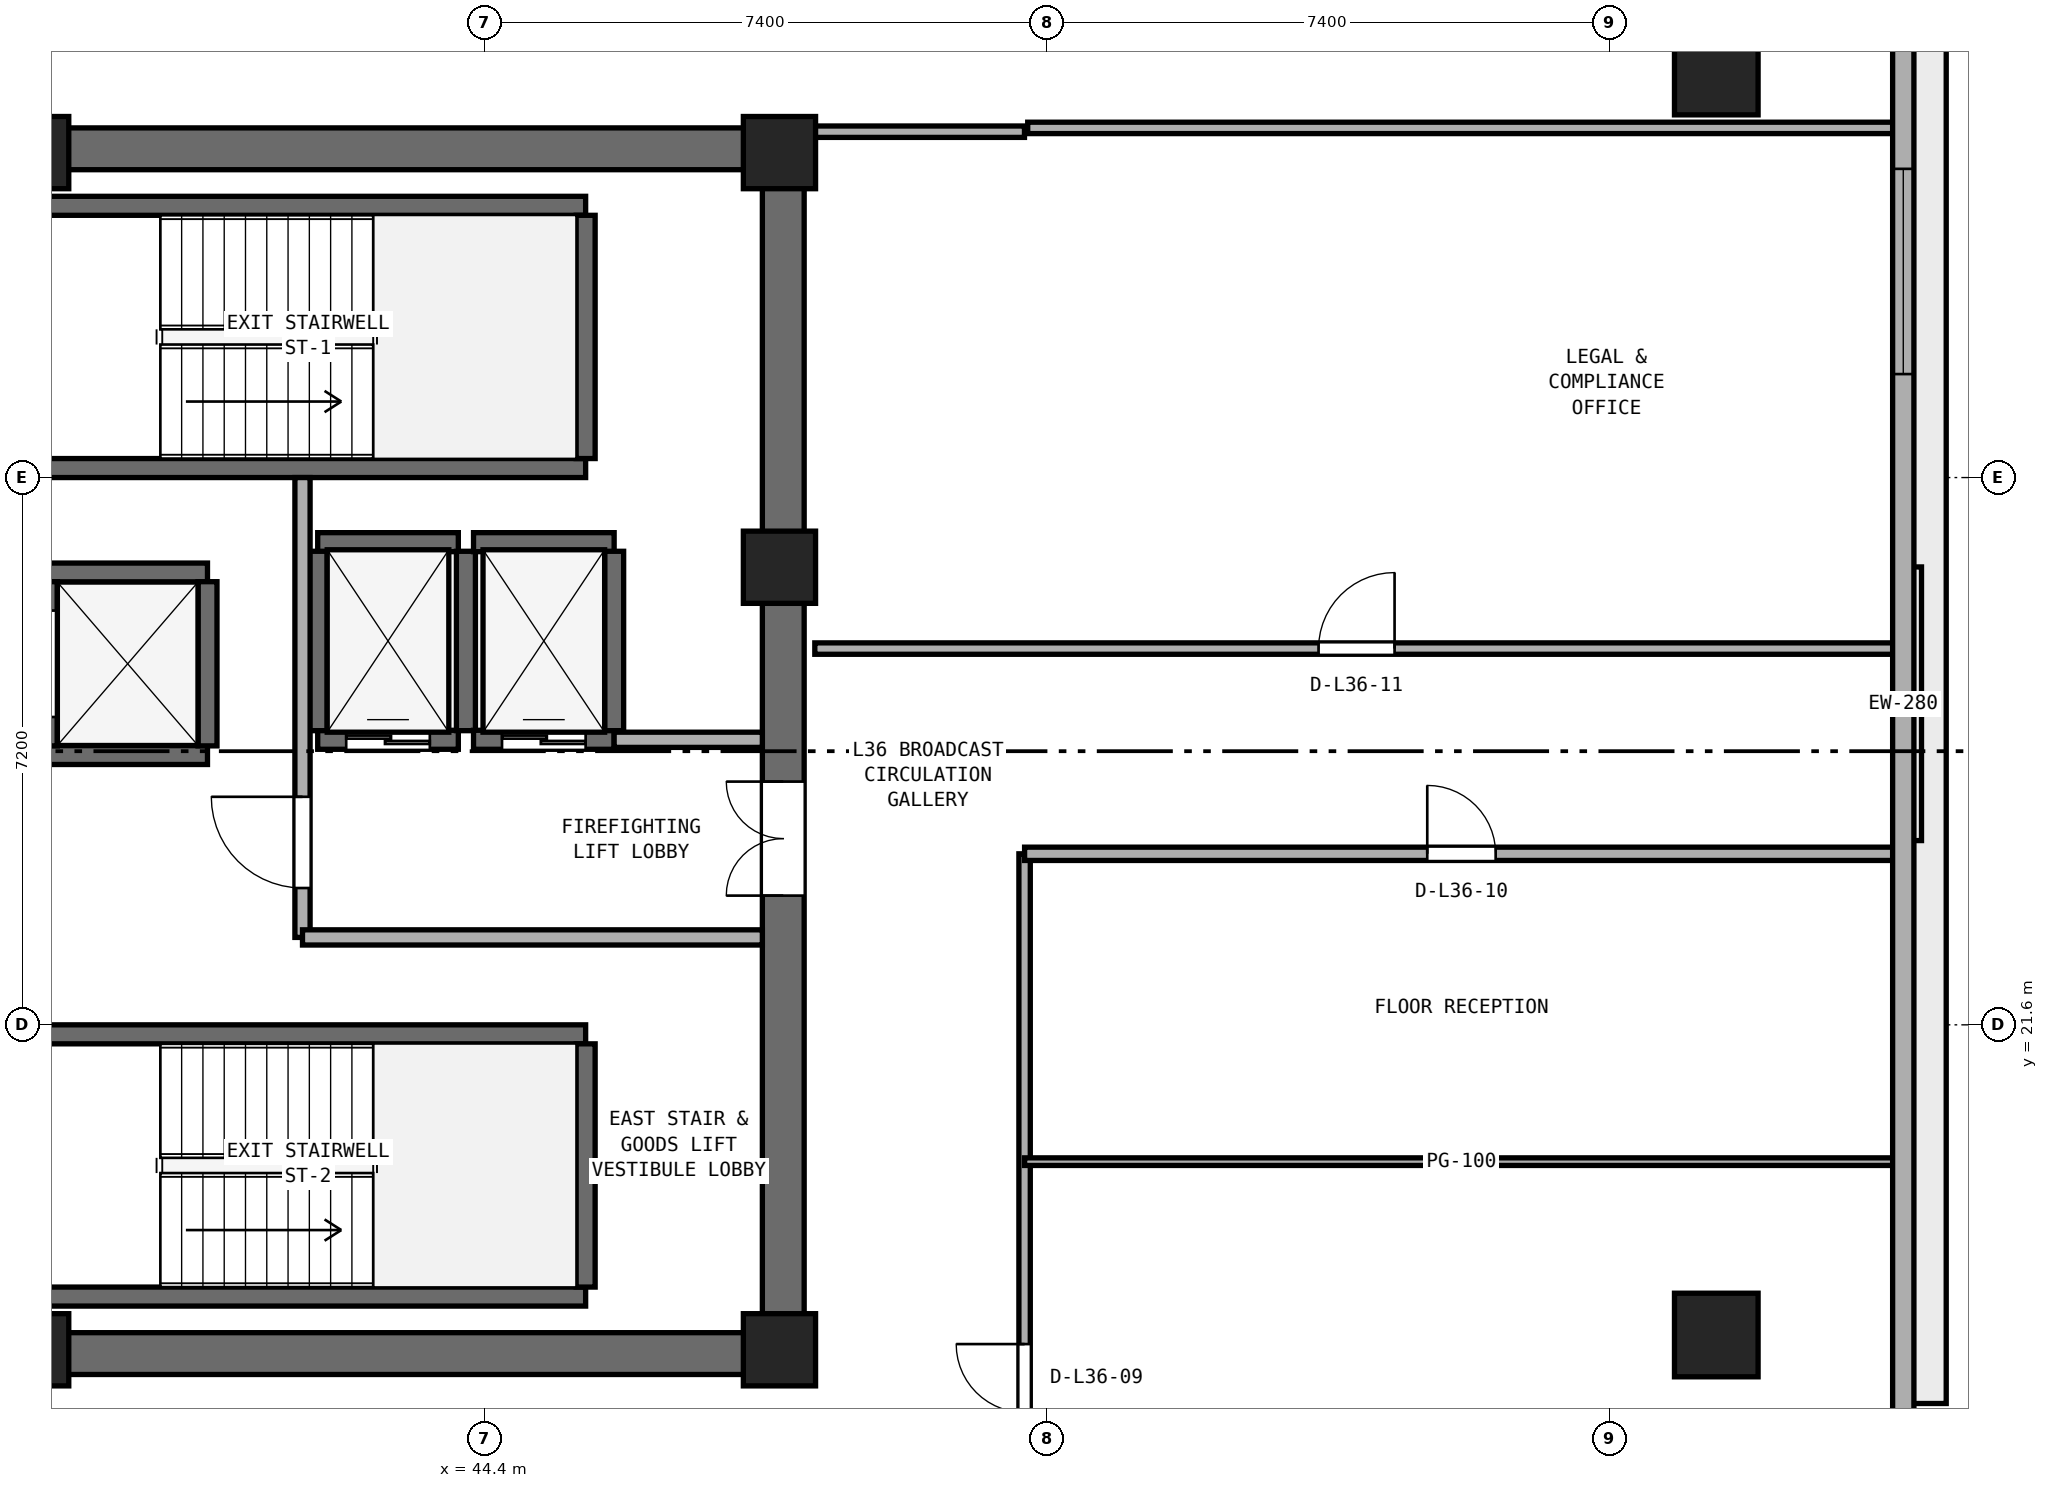
"""IFC4 building model, lengths in metres.
Left out: names, types, materials, properties, quantities, classifications, styles, units other than length and angle.
Written with IfcOpenShell. Run it as: python <this file> out.ifc"""

import sys

from ifc_helpers import new_model, si_unit, direction, frame, frame_2d, origin, origin_2d, place, context, subcontext, project, spatial, rectangle, extrude, element, fill, save


model = new_model("IFC4")
c1 = context("Model", 3, precision=1e-05, world=origin(), true_north=direction((0.0, 1.0)))
c2 = subcontext(c1, "Body", "Model", "MODEL_VIEW")
j1 = project(units=[si_unit("LENGTHUNIT", "METRE"), si_unit("PLANEANGLEUNIT", "RADIAN")], contexts=[c1])
p1 = place(None, origin())
s1 = spatial("IfcSite", under=j1, at=p1, CompositionType="ELEMENT")
p2 = place(p1, origin())
s2 = spatial("IfcBuilding", under=s1, at=p2, CompositionType="ELEMENT")
p3 = place(p2, frame((0.0, 0.0, 144.0)))
s3 = spatial("IfcBuildingStorey", under=s2, at=p3, CompositionType="ELEMENT", Elevation=144.0)
for number, where, z_axis, x_axis in (
    (1, (25.4, 17.275, 0.0), (0.0, 0.0, 1.0), (1.0, 0.0, 0.0)),
    (2, (25.4, 33.125, 0.0), (0.0, 0.0, 1.0), (1.0, 0.0, 0.0)),
):
    element("IfcWall", number, at=place(p3, frame(where, z_axis=z_axis, x_axis=x_axis)), inside=s3, PredefinedType="SHEAR", context=c2, shape_type="SweptSolid", body=[
        extrude(rectangle(XDim=23.2, YDim=0.55, at=frame_2d((11.6, 0.0))), origin(), (0.0, 0.0, 1.0), 3.54),
    ])
p4 = place(p3, frame((48.325, 17.55, 0.0), z_axis=(0.0, 0.0, 1.0), x_axis=(0.0, 1.0, 0.0)))
e3 = element("IfcWall", 3, at=p4, inside=s3, PredefinedType="SHEAR", context=c2, shape_type="SweptSolid", body=[
    extrude(rectangle(XDim=15.3, YDim=0.55, at=frame_2d((7.65, 0.0))), origin(), (0.0, 0.0, 1.0), 3.54),
])
p5 = place(p4, frame((5.75, 0.0, 0.0)))
e4 = element("IfcOpeningElement", 4, at=p5, cuts=e3, PredefinedType="OPENING", context=c2, shape_type="SweptSolid", body=[
    extrude(rectangle(XDim=1.5, YDim=2.15, at=frame_2d((0.75, 1.075))), frame((0.0, 0.285, 0.0), z_axis=(0.0, -1.0, 0.0), x_axis=(1.0, 0.0, 0.0)), (0.0, 0.0, 1.0), 0.57),
])
for number, where, z_axis, x_axis in (
    (5, (38.45, 17.325, 0.0), (0.0, 0.0, 1.0), (1.0, 0.0, 0.0)),
    (6, (48.275, 17.325, 0.0), (0.0, 0.0, 1.0), (1.0, 0.0, 0.0)),
    (7, (48.275, 27.62, 0.0), (0.0, 0.0, 1.0), (1.0, 0.0, 0.0)),
    (8, (48.275, 33.075, 0.0), (0.0, 0.0, 1.0), (1.0, 0.0, 0.0)),
    (9, (38.45, 33.075, 0.0), (0.0, 0.0, 1.0), (1.0, 0.0, 0.0)),
):
    element("IfcColumn", number, at=place(p3, frame(where, z_axis=z_axis, x_axis=x_axis)), inside=s3, PredefinedType="PILASTER", context=c2, shape_type="SweptSolid", body=[
        extrude(rectangle(XDim=0.95, YDim=0.95, at=origin_2d()), origin(), (0.0, 0.0, 1.0), 3.8),
    ])
for number, where, z_axis, x_axis in (
    (10, (60.6, 17.519, 0.0), (0.0, 0.0, 1.0), (1.0, 0.0, 0.0)),
    (11, (60.6, 34.122, 0.0), (0.0, 0.0, 1.0), (1.0, 0.0, 0.0)),
):
    element("IfcColumn", number, at=place(p3, frame(where, z_axis=z_axis, x_axis=x_axis)), inside=s3, PredefinedType="COLUMN", context=c2, shape_type="SweptSolid", body=[
        extrude(rectangle(XDim=1.1, YDim=1.1, at=origin_2d()), origin(), (0.0, 0.0, 1.0), 3.8),
    ])
for number, where, z_axis, x_axis in (
    (12, (38.425, 28.925, 0.0), (0.0, 0.0, 1.0), (1.0, 0.0, 0.0)),
    (13, (38.425, 32.375, 0.0), (0.0, 0.0, 1.0), (1.0, 0.0, 0.0)),
):
    element("IfcWall", number, at=place(p3, frame(where, z_axis=z_axis, x_axis=x_axis)), inside=s3, PredefinedType="SHEAR", context=c2, shape_type="SweptSolid", body=[
        extrude(rectangle(XDim=7.3, YDim=0.25, at=frame_2d((3.65, 0.0))), origin(), (0.0, 0.0, 1.0), 3.54),
    ])
p6 = place(p3, frame((45.725, 29.05, 0.0), z_axis=(0.0, 0.0, 1.0), x_axis=(0.0, 1.0, 0.0)))
e14 = element("IfcWall", 14, at=p6, inside=s3, PredefinedType="SHEAR", context=c2, shape_type="SweptSolid", body=[
    extrude(rectangle(XDim=3.2, YDim=0.25, at=frame_2d((1.6, 0.0))), origin(), (0.0, 0.0, 1.0), 3.54),
])
for number, where, z_axis, x_axis in (
    (15, (38.425, 18.025, 0.0), (0.0, 0.0, 1.0), (1.0, 0.0, 0.0)),
    (16, (38.425, 21.475, 0.0), (0.0, 0.0, 1.0), (1.0, 0.0, 0.0)),
):
    element("IfcWall", number, at=place(p3, frame(where, z_axis=z_axis, x_axis=x_axis)), inside=s3, PredefinedType="SHEAR", context=c2, shape_type="SweptSolid", body=[
        extrude(rectangle(XDim=7.3, YDim=0.25, at=frame_2d((3.65, 0.0))), origin(), (0.0, 0.0, 1.0), 3.54),
    ])
p7 = place(p3, frame((45.725, 18.15, 0.0), z_axis=(0.0, 0.0, 1.0), x_axis=(0.0, 1.0, 0.0)))
e17 = element("IfcWall", 17, at=p7, inside=s3, PredefinedType="SHEAR", context=c2, shape_type="SweptSolid", body=[
    extrude(rectangle(XDim=3.2, YDim=0.25, at=frame_2d((1.6, 0.0))), origin(), (0.0, 0.0, 1.0), 3.54),
])
p8 = place(p3, frame((42.2, 25.35, 0.0), z_axis=(0.0, 0.0, 1.0), x_axis=(1.0, 0.0, 0.0)))
e18 = element("IfcWall", 18, at=p8, inside=s3, PredefinedType="SHEAR", context=c2, shape_type="SweptSolid", body=[
    extrude(rectangle(XDim=1.85, YDim=0.25, at=frame_2d((0.925, 0.0))), origin(), (0.0, 0.0, 1.0), 3.54),
])
p9 = place(p8, frame((0.375, 0.0, 0.0)))
e19 = element("IfcOpeningElement", 19, at=p9, cuts=e18, PredefinedType="OPENING", context=c2, shape_type="SweptSolid", body=[
    extrude(rectangle(XDim=1.1, YDim=2.15, at=frame_2d((0.55, 1.075))), frame((0.0, 0.135, 0.0), z_axis=(0.0, -1.0, 0.0), x_axis=(1.0, 0.0, 0.0)), (0.0, 0.0, 1.0), 0.27),
])
p10 = place(p3, frame((42.2, 27.95, 0.0), z_axis=(0.0, 0.0, 1.0), x_axis=(1.0, 0.0, 0.0)))
e20 = element("IfcWall", 20, at=p10, inside=s3, PredefinedType="SHEAR", context=c2, shape_type="SweptSolid", body=[
    extrude(rectangle(XDim=1.85, YDim=0.25, at=frame_2d((0.925, 0.0))), origin(), (0.0, 0.0, 1.0), 3.54),
])
for number, where, z_axis, x_axis in (
    (21, (42.2, 25.47, 0.0), (0.0, 0.0, 1.0), (0.0, 1.0, 0.0)),
    (22, (44.15, 25.47, 0.0), (0.0, 0.0, 1.0), (0.0, 1.0, 0.0)),
):
    element("IfcWall", number, at=place(p3, frame(where, z_axis=z_axis, x_axis=x_axis)), inside=s3, PredefinedType="SHEAR", context=c2, shape_type="SweptSolid", body=[
        extrude(rectangle(XDim=2.36, YDim=0.25, at=frame_2d((1.18, 0.0))), origin(), (0.0, 0.0, 1.0), 3.54),
    ])
p11 = place(p3, frame((44.25, 25.35, 0.0), z_axis=(0.0, 0.0, 1.0), x_axis=(1.0, 0.0, 0.0)))
e23 = element("IfcWall", 23, at=p11, inside=s3, PredefinedType="SHEAR", context=c2, shape_type="SweptSolid", body=[
    extrude(rectangle(XDim=1.85, YDim=0.25, at=frame_2d((0.925, 0.0))), origin(), (0.0, 0.0, 1.0), 3.54),
])
p12 = place(p11, frame((0.375, 0.0, 0.0)))
e24 = element("IfcOpeningElement", 24, at=p12, cuts=e23, PredefinedType="OPENING", context=c2, shape_type="SweptSolid", body=[
    extrude(rectangle(XDim=1.1, YDim=2.15, at=frame_2d((0.55, 1.075))), frame((0.0, 0.135, 0.0), z_axis=(0.0, -1.0, 0.0), x_axis=(1.0, 0.0, 0.0)), (0.0, 0.0, 1.0), 0.27),
])
p13 = place(p3, frame((44.25, 27.95, 0.0), z_axis=(0.0, 0.0, 1.0), x_axis=(1.0, 0.0, 0.0)))
e25 = element("IfcWall", 25, at=p13, inside=s3, PredefinedType="SHEAR", context=c2, shape_type="SweptSolid", body=[
    extrude(rectangle(XDim=1.85, YDim=0.25, at=frame_2d((0.925, 0.0))), origin(), (0.0, 0.0, 1.0), 3.54),
])
p14 = place(p3, frame((46.1, 25.47, 0.0), z_axis=(0.0, 0.0, 1.0), x_axis=(0.0, 1.0, 0.0)))
e26 = element("IfcWall", 26, at=p14, inside=s3, PredefinedType="SHEAR", context=c2, shape_type="SweptSolid", body=[
    extrude(rectangle(XDim=2.36, YDim=0.25, at=frame_2d((1.18, 0.0))), origin(), (0.0, 0.0, 1.0), 3.54),
])
for number, where, z_axis, x_axis in (
    (27, (38.65, 25.15, 0.0), (0.0, 0.0, 1.0), (1.0, 0.0, 0.0)),
    (28, (38.65, 27.55, 0.0), (0.0, 0.0, 1.0), (1.0, 0.0, 0.0)),
):
    element("IfcWall", number, at=place(p3, frame(where, z_axis=z_axis, x_axis=x_axis)), inside=s3, PredefinedType="SHEAR", context=c2, shape_type="SweptSolid", body=[
        extrude(rectangle(XDim=2.1, YDim=0.25, at=frame_2d((1.05, 0.0))), origin(), (0.0, 0.0, 1.0), 3.54),
    ])
p15 = place(p3, frame((38.65, 25.27, 0.0), z_axis=(0.0, 0.0, 1.0), x_axis=(0.0, 1.0, 0.0)))
e29 = element("IfcWall", 29, at=p15, inside=s3, PredefinedType="SHEAR", context=c2, shape_type="SweptSolid", body=[
    extrude(rectangle(XDim=2.16, YDim=0.25, at=frame_2d((1.08, 0.0))), origin(), (0.0, 0.0, 1.0), 3.54),
])
p16 = place(p15, frame((0.38, 0.0, 0.0)))
e30 = element("IfcOpeningElement", 30, at=p16, cuts=e29, PredefinedType="OPENING", context=c2, shape_type="SweptSolid", body=[
    extrude(rectangle(XDim=1.4, YDim=2.2, at=frame_2d((0.7, 1.1))), frame((0.0, 0.135, 0.0), z_axis=(0.0, -1.0, 0.0), x_axis=(1.0, 0.0, 0.0)), (0.0, 0.0, 1.0), 0.27),
])
p17 = place(p3, frame((40.75, 25.27, 0.0), z_axis=(0.0, 0.0, 1.0), x_axis=(0.0, 1.0, 0.0)))
e31 = element("IfcWall", 31, at=p17, inside=s3, PredefinedType="SHEAR", context=c2, shape_type="SweptSolid", body=[
    extrude(rectangle(XDim=2.16, YDim=0.25, at=frame_2d((1.08, 0.0))), origin(), (0.0, 0.0, 1.0), 3.54),
])
p18 = place(p3, frame((42.0, 22.75, 0.0), z_axis=(0.0, 0.0, 1.0), x_axis=(0.0, 1.0, 0.0)))
e32 = element("IfcWall", 32, at=p18, inside=s3, PredefinedType="SOLIDWALL", context=c2, shape_type="SweptSolid", body=[
    extrude(rectangle(XDim=6.05, YDim=0.2, at=frame_2d((3.025, 0.0))), origin(), (0.0, 0.0, 1.0), 3.54),
])
p19 = place(p18, frame((0.65, 0.0, 0.0)))
e33 = element("IfcOpeningElement", 33, at=p19, cuts=e32, PredefinedType="OPENING", context=c2, shape_type="SweptSolid", body=[
    extrude(rectangle(XDim=1.2, YDim=2.15, at=frame_2d((0.6, 1.075))), frame((0.0, 0.11, 0.0), z_axis=(0.0, -1.0, 0.0), x_axis=(1.0, 0.0, 0.0)), (0.0, 0.0, 1.0), 0.22),
])
p20 = place(p3, frame((42.0, 22.75, 0.0), z_axis=(0.0, 0.0, 1.0), x_axis=(1.0, 0.0, 0.0)))
e34 = element("IfcWall", 34, at=p20, inside=s3, PredefinedType="SOLIDWALL", context=c2, shape_type="SweptSolid", body=[
    extrude(rectangle(XDim=6.05, YDim=0.2, at=frame_2d((3.025, 0.0))), origin(), (0.0, 0.0, 1.0), 3.54),
])
p21 = place(p3, frame((46.1, 25.35, 0.0), z_axis=(0.0, 0.0, 1.0), x_axis=(1.0, 0.0, 0.0)))
e35 = element("IfcWall", 35, at=p21, inside=s3, PredefinedType="SOLIDWALL", context=c2, shape_type="SweptSolid", body=[
    extrude(rectangle(XDim=1.95, YDim=0.2, at=frame_2d((0.975, 0.0))), origin(), (0.0, 0.0, 1.0), 3.54),
])
p22 = place(p3, frame((51.5, 5.11, 0.0), z_axis=(0.0, 0.0, 1.0), x_axis=(0.0, 1.0, 0.0)))
e36 = element("IfcWall", 36, at=p22, inside=s3, PredefinedType="PARTITIONING", context=c2, shape_type="SweptSolid", body=[
    extrude(rectangle(XDim=18.74, YDim=0.15, at=frame_2d((9.37, 0.0))), origin(), (0.0, 0.0, 1.0), 3.54),
])
p23 = place(p22, frame((11.39, 0.0, 0.0)))
e37 = element("IfcOpeningElement", 37, at=p23, cuts=e36, PredefinedType="OPENING", context=c2, shape_type="SweptSolid", body=[
    extrude(rectangle(XDim=0.9, YDim=2.1, at=frame_2d((0.45, 1.05))), frame((0.0, 0.085, 0.0), z_axis=(0.0, -1.0, 0.0), x_axis=(1.0, 0.0, 0.0)), (0.0, 0.0, 1.0), 0.17),
])
p24 = place(p3, frame((51.5, 19.8, 0.0), z_axis=(0.0, 0.0, 1.0), x_axis=(1.0, 0.0, 0.0)))
e38 = element("IfcWall", 38, at=p24, inside=s3, PredefinedType="PARTITIONING", context=c2, shape_type="SweptSolid", body=[
    extrude(rectangle(XDim=11.495, YDim=0.1, at=frame_2d((5.748, 0.0))), origin(), (0.0, 0.0, 1.0), 3.54),
])
p25 = place(p3, frame((51.5, 23.85, 0.0), z_axis=(0.0, 0.0, 1.0), x_axis=(1.0, 0.0, 0.0)))
e39 = element("IfcWall", 39, at=p25, inside=s3, PredefinedType="PARTITIONING", context=c2, shape_type="SweptSolid", body=[
    extrude(rectangle(XDim=11.495, YDim=0.175, at=frame_2d((5.748, 0.0))), origin(), (0.0, 0.0, 1.0), 3.54),
])
p26 = place(p25, frame((5.298, 0.0, 0.0)))
e40 = element("IfcOpeningElement", 40, at=p26, cuts=e39, PredefinedType="OPENING", context=c2, shape_type="SweptSolid", body=[
    extrude(rectangle(XDim=0.9, YDim=2.1, at=frame_2d((0.45, 1.05))), frame((0.0, 0.097, 0.0), z_axis=(0.0, -1.0, 0.0), x_axis=(1.0, 0.0, 0.0)), (0.0, 0.0, 1.0), 0.195),
])
p27 = place(p3, frame((48.74, 26.55, 0.0), z_axis=(0.0, 0.0, 1.0), x_axis=(1.0, 0.0, 0.0)))
e41 = element("IfcWall", 41, at=p27, inside=s3, PredefinedType="PARTITIONING", context=c2, shape_type="SweptSolid", body=[
    extrude(rectangle(XDim=14.255, YDim=0.15, at=frame_2d((7.127, 0.0))), origin(), (0.0, 0.0, 1.0), 3.54),
])
p28 = place(p27, frame((6.627, 0.0, 0.0)))
e42 = element("IfcOpeningElement", 42, at=p28, cuts=e41, PredefinedType="OPENING", context=c2, shape_type="SweptSolid", body=[
    extrude(rectangle(XDim=1.0, YDim=2.12, at=frame_2d((0.5, 1.06))), frame((0.0, 0.085, 0.0), z_axis=(0.0, -1.0, 0.0), x_axis=(1.0, 0.0, 0.0)), (0.0, 0.0, 1.0), 0.17),
])
p29 = place(p3, frame((48.74, 33.35, 0.0), z_axis=(0.0, 0.0, 1.0), x_axis=(1.0, 0.0, 0.0)))
e43 = element("IfcWall", 43, at=p29, inside=s3, PredefinedType="PARTITIONING", context=c2, shape_type="SweptSolid", body=[
    extrude(rectangle(XDim=2.759, YDim=0.15, at=frame_2d((1.379, 0.0))), origin(), (0.0, 0.0, 1.0), 2.923),
])
p30 = place(p3, frame((51.541, 33.4, 0.0), z_axis=(0.0, 0.0, 1.0), x_axis=(1.0, 0.0, 0.0)))
e44 = element("IfcWall", 44, at=p30, inside=s3, PredefinedType="PARTITIONING", context=c2, shape_type="SweptSolid", body=[
    extrude(rectangle(XDim=11.454, YDim=0.15, at=frame_2d((5.727, 0.0))), origin(), (0.0, 0.0, 1.0), 2.923),
])
p31 = place(p3, frame((63.06, 16.418, 0.0), z_axis=(0.0, 0.0, 1.0), x_axis=(0.0, 1.0, 0.0)))
e45 = element("IfcWall", 45, at=p31, inside=s3, PredefinedType="STANDARD", context=c2, shape_type="SweptSolid", body=[
    extrude(rectangle(XDim=18.812, YDim=0.28, at=frame_2d((9.406, 0.0))), origin(), (0.0, 0.0, 1.0), 3.54),
])
p32 = place(p31, frame((13.743, 0.0, 0.9)))
e46 = element("IfcOpeningElement", 46, at=p32, cuts=e45, PredefinedType="OPENING", context=c2, shape_type="SweptSolid", body=[
    extrude(rectangle(XDim=2.7, YDim=1.75, at=frame_2d((1.35, 0.875))), frame((0.0, 0.15, 0.0), z_axis=(0.0, -1.0, 0.0), x_axis=(1.0, 0.0, 0.0)), (0.0, 0.0, 1.0), 0.3),
])
p33 = place(p9, origin())
e47 = element("IfcDoor", 47, at=p33, inside=s3, OperationType="DOUBLE_DOOR_SLIDING", PredefinedType="DOOR", context=c2, shape_type="SweptSolid", body=[
    extrude(rectangle(XDim=1.1, YDim=2.15, at=frame_2d((0.55, 1.075))), frame((0.0, 0.025, 0.0), z_axis=(0.0, -1.0, 0.0), x_axis=(1.0, 0.0, 0.0)), (0.0, 0.0, 1.0), 0.05),
])
fill(e19, e47)
p34 = place(p12, origin())
e48 = element("IfcDoor", 48, at=p34, inside=s3, OperationType="DOUBLE_DOOR_SLIDING", PredefinedType="DOOR", context=c2, shape_type="SweptSolid", body=[
    extrude(rectangle(XDim=1.1, YDim=2.15, at=frame_2d((0.55, 1.075))), frame((0.0, 0.025, 0.0), z_axis=(0.0, -1.0, 0.0), x_axis=(1.0, 0.0, 0.0)), (0.0, 0.0, 1.0), 0.05),
])
fill(e24, e48)
p35 = place(p19, origin())
e49 = element("IfcDoor", 49, at=p35, inside=s3, OperationType="SINGLE_SWING_RIGHT", PredefinedType="DOOR", context=c2, shape_type="SweptSolid", body=[
    extrude(rectangle(XDim=1.2, YDim=2.15, at=frame_2d((0.6, 1.075))), frame((0.0, 0.025, 0.0), z_axis=(0.0, -1.0, 0.0), x_axis=(1.0, 0.0, 0.0)), (0.0, 0.0, 1.0), 0.05),
])
fill(e33, e49)
p36 = place(p5, origin())
e50 = element("IfcDoor", 50, at=p36, inside=s3, OperationType="DOUBLE_DOOR_SINGLE_SWING", PredefinedType="DOOR", context=c2, shape_type="SweptSolid", body=[
    extrude(rectangle(XDim=1.5, YDim=2.15, at=frame_2d((0.75, 1.075))), frame((0.0, 0.025, 0.0), z_axis=(0.0, -1.0, 0.0), x_axis=(1.0, 0.0, 0.0)), (0.0, 0.0, 1.0), 0.05),
])
fill(e4, e50)
p37 = place(p23, origin())
e51 = element("IfcDoor", 51, at=p37, inside=s3, OperationType="SINGLE_SWING_RIGHT", PredefinedType="DOOR", context=c2, shape_type="SweptSolid", body=[
    extrude(rectangle(XDim=0.9, YDim=2.1, at=frame_2d((0.45, 1.05))), frame((0.0, 0.025, 0.0), z_axis=(0.0, -1.0, 0.0), x_axis=(1.0, 0.0, 0.0)), (0.0, 0.0, 1.0), 0.05),
])
fill(e37, e51)
p38 = place(p26, origin())
e52 = element("IfcDoor", 52, at=p38, inside=s3, OperationType="SINGLE_SWING_LEFT", PredefinedType="DOOR", context=c2, shape_type="SweptSolid", body=[
    extrude(rectangle(XDim=0.9, YDim=2.1, at=frame_2d((0.45, 1.05))), frame((0.0, 0.025, 0.0), z_axis=(0.0, -1.0, 0.0), x_axis=(1.0, 0.0, 0.0)), (0.0, 0.0, 1.0), 0.05),
])
fill(e40, e52)
p39 = place(p28, origin())
e53 = element("IfcDoor", 53, at=p39, inside=s3, OperationType="SINGLE_SWING_RIGHT", PredefinedType="DOOR", context=c2, shape_type="SweptSolid", body=[
    extrude(rectangle(XDim=1.0, YDim=2.12, at=frame_2d((0.5, 1.06))), frame((0.0, 0.025, 0.0), z_axis=(0.0, -1.0, 0.0), x_axis=(1.0, 0.0, 0.0)), (0.0, 0.0, 1.0), 0.05),
])
fill(e42, e53)
p40 = place(p32, origin())
e54 = element("IfcWindow", 54, at=p40, inside=s3, PartitioningType="SINGLE_PANEL", PredefinedType="WINDOW", context=c2, shape_type="SweptSolid", body=[
    extrude(rectangle(XDim=2.7, YDim=1.75, at=frame_2d((1.35, 0.875))), frame((0.0, 0.03, 0.0), z_axis=(0.0, -1.0, 0.0), x_axis=(1.0, 0.0, 0.0)), (0.0, 0.0, 1.0), 0.06),
])
fill(e46, e54)
save(model, sys.argv[1])
